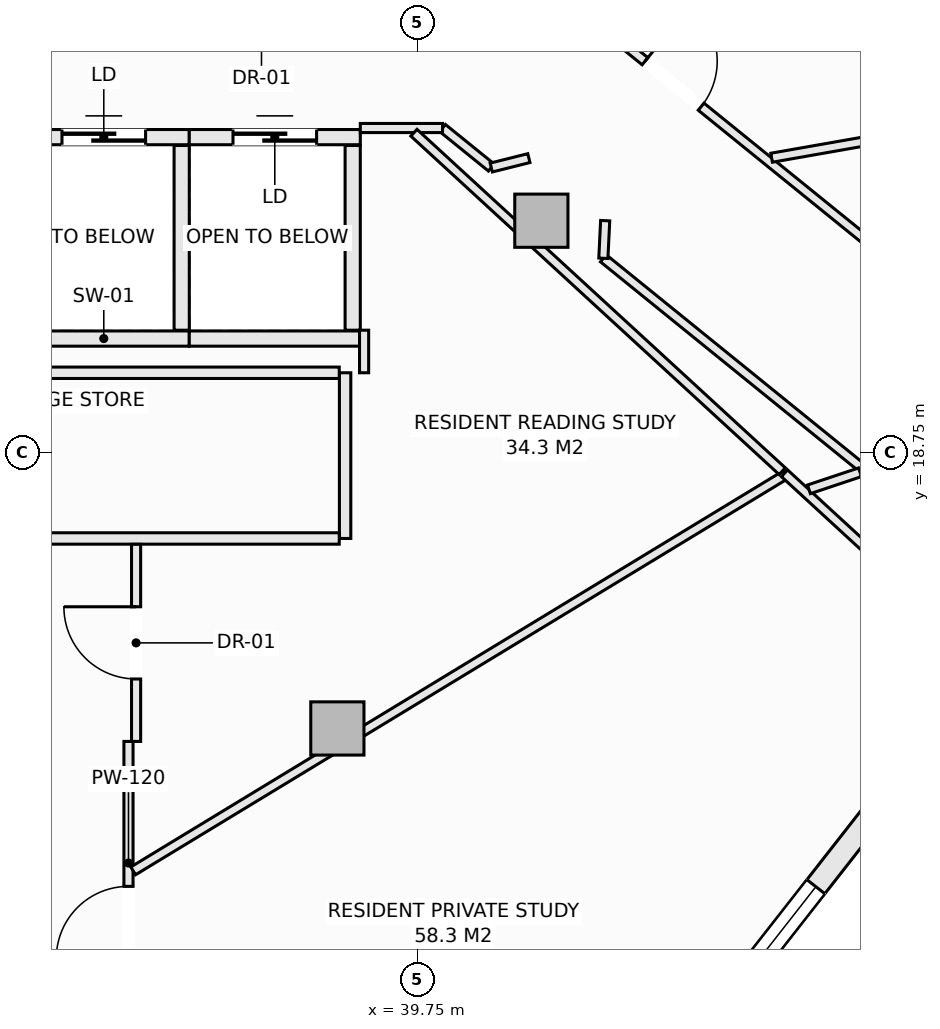
"""IFC4 building model, lengths in metres.
Left out: names, types, materials, properties, quantities, classifications, styles, units other than length and angle.
Written with IfcOpenShell. Run it as: python <this file> out.ifc"""

import sys

from ifc_helpers import new_model, si_unit, direction, frame, frame_2d, origin, origin_2d, place, context, subcontext, project, spatial, rectangle, extrude, element, fill, save


model = new_model("IFC4")
c1 = context("Model", 3, precision=1e-05, world=origin(), true_north=direction((0.0, 1.0)))
c2 = subcontext(c1, "Body", "Model", "MODEL_VIEW")
j1 = project(units=[si_unit("LENGTHUNIT", "METRE"), si_unit("PLANEANGLEUNIT", "RADIAN")], contexts=[c1])
p1 = place(None, origin())
s1 = spatial("IfcSite", under=j1, at=p1, CompositionType="ELEMENT")
p2 = place(p1, origin())
s2 = spatial("IfcBuilding", under=s1, at=p2, CompositionType="ELEMENT")
p3 = place(p2, frame((0.0, 0.0, 222.8)))
s3 = spatial("IfcBuildingStorey", under=s2, at=p3, CompositionType="ELEMENT", Elevation=222.8)
for number, where, z_axis, x_axis in (
    (1, (38.698, 15.121, -0.27), (0.0, 0.0, 1.0), (1.0, 0.0, 0.0)),
    (2, (41.382, 21.801, -0.27), (0.0, 0.0, 1.0), (1.0, 0.0, 0.0)),
):
    element("IfcColumn", number, at=place(p3, frame(where, z_axis=z_axis, x_axis=x_axis)), inside=s3, PredefinedType="COLUMN", context=c2, shape_type="SweptSolid", body=[
        extrude(rectangle(XDim=0.7, YDim=0.7, at=origin_2d()), origin(), (0.0, 0.0, 1.0), 3.3),
    ])
p4 = place(p3, frame((42.5, 9.853, 0.0), z_axis=(0.0, 0.0, 1.0), x_axis=(0.616450126935, 0.787393955401, 0.0)))
e3 = element("IfcWall", 3, at=p4, inside=s3, PredefinedType="SOLIDWALL", context=c2, shape_type="SweptSolid", body=[
    extrude(rectangle(XDim=5.893, YDim=0.3, at=frame_2d((2.946, 0.0))), origin(), (0.0, 0.0, 1.0), 2.605),
])
p5 = place(p4, frame((1.846, 0.0, 0.72)))
e4 = element("IfcOpeningElement", 4, at=p5, cuts=e3, PredefinedType="OPENING", context=c2, shape_type="SweptSolid", body=[
    extrude(rectangle(XDim=2.2, YDim=1.65, at=frame_2d((1.1, 0.825))), frame((0.0, 0.16, 0.0), z_axis=(0.0, -1.0, 0.0), x_axis=(1.0, 0.0, 0.0)), (0.0, 0.0, 1.0), 0.32),
])
p6 = place(p3, frame((34.5, 22.9, 0.0), z_axis=(0.0, 0.0, 1.0), x_axis=(1.0, 0.0, 0.0)))
e5 = element("IfcWall", 5, at=p6, inside=s3, PredefinedType="SOLIDWALL", context=c2, shape_type="SweptSolid", body=[
    extrude(rectangle(XDim=2.25, YDim=0.2, at=frame_2d((1.125, 0.0))), origin(), (0.0, 0.0, 1.0), 3.03),
])
p7 = place(p6, frame((0.575, 0.0, 0.0)))
e6 = element("IfcOpeningElement", 6, at=p7, cuts=e5, PredefinedType="OPENING", context=c2, shape_type="SweptSolid", body=[
    extrude(rectangle(XDim=1.1, YDim=2.2, at=frame_2d((0.55, 1.1))), frame((0.0, 0.11, 0.0), z_axis=(0.0, -1.0, 0.0), x_axis=(1.0, 0.0, 0.0)), (0.0, 0.0, 1.0), 0.22),
])
p8 = place(p3, frame((34.5, 20.25, 0.0), z_axis=(0.0, 0.0, 1.0), x_axis=(1.0, 0.0, 0.0)))
e7 = element("IfcWall", 7, at=p8, inside=s3, PredefinedType="SOLIDWALL", context=c2, shape_type="SweptSolid", body=[
    extrude(rectangle(XDim=2.25, YDim=0.2, at=frame_2d((1.125, 0.0))), origin(), (0.0, 0.0, 1.0), 3.03),
])
p9 = place(p3, frame((36.65, 20.36, 0.0), z_axis=(0.0, 0.0, 1.0), x_axis=(0.0, 1.0, 0.0)))
e8 = element("IfcWall", 8, at=p9, inside=s3, PredefinedType="SOLIDWALL", context=c2, shape_type="SweptSolid", body=[
    extrude(rectangle(XDim=2.43, YDim=0.2, at=frame_2d((1.215, 0.0))), origin(), (0.0, 0.0, 1.0), 3.03),
])
p10 = place(p3, frame((36.75, 22.9, 0.0), z_axis=(0.0, 0.0, 1.0), x_axis=(1.0, 0.0, 0.0)))
e9 = element("IfcWall", 9, at=p10, inside=s3, PredefinedType="SOLIDWALL", context=c2, shape_type="SweptSolid", body=[
    extrude(rectangle(XDim=2.25, YDim=0.2, at=frame_2d((1.125, 0.0))), origin(), (0.0, 0.0, 1.0), 3.03),
])
p11 = place(p10, frame((0.575, 0.0, 0.0)))
e10 = element("IfcOpeningElement", 10, at=p11, cuts=e9, PredefinedType="OPENING", context=c2, shape_type="SweptSolid", body=[
    extrude(rectangle(XDim=1.1, YDim=2.2, at=frame_2d((0.55, 1.1))), frame((0.0, 0.11, 0.0), z_axis=(0.0, -1.0, 0.0), x_axis=(1.0, 0.0, 0.0)), (0.0, 0.0, 1.0), 0.22),
])
p12 = place(p3, frame((36.75, 20.25, 0.0), z_axis=(0.0, 0.0, 1.0), x_axis=(1.0, 0.0, 0.0)))
e11 = element("IfcWall", 11, at=p12, inside=s3, PredefinedType="SOLIDWALL", context=c2, shape_type="SweptSolid", body=[
    extrude(rectangle(XDim=2.25, YDim=0.2, at=frame_2d((1.125, 0.0))), origin(), (0.0, 0.0, 1.0), 3.03),
])
p13 = place(p3, frame((38.9, 20.36, 0.0), z_axis=(0.0, 0.0, 1.0), x_axis=(0.0, 1.0, 0.0)))
e12 = element("IfcWall", 12, at=p13, inside=s3, PredefinedType="SOLIDWALL", context=c2, shape_type="SweptSolid", body=[
    extrude(rectangle(XDim=2.43, YDim=0.2, at=frame_2d((1.215, 0.0))), origin(), (0.0, 0.0, 1.0), 3.03),
])
p14 = place(p3, frame((38.8, 17.62, 0.0), z_axis=(0.0, 0.0, 1.0), x_axis=(0.0, 1.0, 0.0)))
e13 = element("IfcWall", 13, at=p14, inside=s3, PredefinedType="PARTITIONING", context=c2, shape_type="SweptSolid", body=[
    extrude(rectangle(XDim=2.18, YDim=0.15, at=frame_2d((1.09, 0.0))), origin(), (0.0, 0.0, 1.0), 3.03),
])
p15 = place(p3, frame((30.077, 17.62, 0.0), z_axis=(0.0, 0.0, 1.0), x_axis=(1.0, 0.0, 0.0)))
e14 = element("IfcWall", 14, at=p15, inside=s3, PredefinedType="PARTITIONING", context=c2, shape_type="SweptSolid", body=[
    extrude(rectangle(XDim=8.646, YDim=0.15, at=frame_2d((4.323, 0.0))), origin(), (0.0, 0.0, 1.0), 3.03),
])
p16 = place(p15, frame((2.717, 0.0, 0.0)))
e15 = element("IfcOpeningElement", 15, at=p16, cuts=e14, PredefinedType="OPENING", context=c2, shape_type="SweptSolid", body=[
    extrude(rectangle(XDim=0.95, YDim=2.1, at=frame_2d((0.475, 1.05))), frame((0.0, 0.085, 0.0), z_axis=(0.0, -1.0, 0.0), x_axis=(1.0, 0.0, 0.0)), (0.0, 0.0, 1.0), 0.17),
])
p17 = place(p3, frame((30.077, 19.8, 0.0), z_axis=(0.0, 0.0, 1.0), x_axis=(1.0, 0.0, 0.0)))
e16 = element("IfcWall", 16, at=p17, inside=s3, PredefinedType="PARTITIONING", context=c2, shape_type="SweptSolid", body=[
    extrude(rectangle(XDim=8.646, YDim=0.15, at=frame_2d((4.323, 0.0))), origin(), (0.0, 0.0, 1.0), 3.03),
])
p18 = place(p3, frame((39.05, 19.8, 0.0), z_axis=(0.0, 0.0, 1.0), x_axis=(0.0, 1.0, 0.0)))
e17 = element("IfcWall", 17, at=p18, inside=s3, PredefinedType="PARTITIONING", context=c2, shape_type="SweptSolid", body=[
    extrude(rectangle(XDim=0.56, YDim=0.12, at=frame_2d((0.28, 0.0))), origin(), (0.0, 0.0, 1.0), 3.03),
])
p19 = place(p3, frame((41.52, 24.892, 0.0), z_axis=(0.0, 0.0, 1.0), x_axis=(0.777027167904, -0.629467060567, 0.0)))
e18 = element("IfcWall", 18, at=p19, inside=s3, PredefinedType="PARTITIONING", context=c2, shape_type="SweptSolid", body=[
    extrude(rectangle(XDim=8.62, YDim=0.12, at=frame_2d((4.31, 0.0))), origin(), (0.0, 0.0, 1.0), 2.77),
])
p20 = place(p19, frame((5.4, 0.0, 0.0)))
e19 = element("IfcOpeningElement", 19, at=p20, cuts=e18, PredefinedType="OPENING", context=c2, shape_type="SweptSolid", body=[
    extrude(rectangle(XDim=0.95, YDim=2.1, at=frame_2d((0.475, 1.05))), frame((0.0, 0.07, 0.0), z_axis=(0.0, -1.0, 0.0), x_axis=(1.0, 0.0, 0.0)), (0.0, 0.0, 1.0), 0.14),
])
p21 = place(p19, frame((1.578, 0.0, 0.0)))
e20 = element("IfcOpeningElement", 20, at=p21, cuts=e18, PredefinedType="OPENING", context=c2, shape_type="SweptSolid", body=[
    extrude(rectangle(XDim=0.95, YDim=2.1, at=frame_2d((0.475, 1.05))), frame((0.0, 0.07, 0.0), z_axis=(0.0, -1.0, 0.0), x_axis=(1.0, 0.0, 0.0)), (0.0, 0.0, 1.0), 0.14),
])
p22 = place(p3, frame((40.082, 23.02, 0.0), z_axis=(0.0, 0.0, 1.0), x_axis=(0.776900403314, -0.629623509195, 0.0)))
e21 = element("IfcWall", 21, at=p22, inside=s3, PredefinedType="PARTITIONING", context=c2, shape_type="SweptSolid", body=[
    extrude(rectangle(XDim=0.825, YDim=0.12, at=frame_2d((0.413, 0.0))), origin(), (0.0, 0.0, 1.0), 3.03),
])
p23 = place(p3, frame((42.198, 21.306, 0.0), z_axis=(0.0, 0.0, 1.0), x_axis=(0.777012245854, -0.629485480208, 0.0)))
e22 = element("IfcWall", 22, at=p23, inside=s3, PredefinedType="PARTITIONING", context=c2, shape_type="SweptSolid", body=[
    extrude(rectangle(XDim=4.718, YDim=0.12, at=frame_2d((2.359, 0.0))), origin(), (0.0, 0.0, 1.0), 2.77),
])
p24 = place(p3, frame((42.198, 21.306, 0.0), z_axis=(0.0, 0.0, 1.0), x_axis=(0.048267148556, 0.998834461946, 0.0)))
e23 = element("IfcWall", 23, at=p24, inside=s3, PredefinedType="PARTITIONING", context=c2, shape_type="SweptSolid", body=[
    extrude(rectangle(XDim=0.496, YDim=0.12, at=frame_2d((0.248, 0.0))), origin(), (0.0, 0.0, 1.0), 3.03),
])
p25 = place(p3, frame((40.723, 22.5, 0.0), z_axis=(0.0, 0.0, 1.0), x_axis=(0.970029850173, 0.24298578101, 0.0)))
e24 = element("IfcWall", 24, at=p25, inside=s3, PredefinedType="PARTITIONING", context=c2, shape_type="SweptSolid", body=[
    extrude(rectangle(XDim=0.51, YDim=0.12, at=frame_2d((0.255, 0.0))), origin(), (0.0, 0.0, 1.0), 3.03),
])
p26 = place(p3, frame((39.0, 23.02, 0.0), z_axis=(0.0, 0.0, 1.0), x_axis=(1.0, 0.0, 0.0)))
e25 = element("IfcWall", 25, at=p26, inside=s3, PredefinedType="PARTITIONING", context=c2, shape_type="SweptSolid", body=[
    extrude(rectangle(XDim=1.082, YDim=0.12, at=frame_2d((0.541, 0.0))), origin(), (0.0, 0.0, 1.0), 3.03),
])
p27 = place(p3, frame((36.05, 14.95, 0.0), z_axis=(0.0, 0.0, 1.0), x_axis=(0.0, 1.0, 0.0)))
e26 = element("IfcWall", 26, at=p27, inside=s3, PredefinedType="PARTITIONING", context=c2, shape_type="SweptSolid", body=[
    extrude(rectangle(XDim=2.593, YDim=0.12, at=frame_2d((1.296, 0.0))), origin(), (0.0, 0.0, 1.0), 3.03),
])
p28 = place(p27, frame((0.822, 0.0, 0.0)))
e27 = element("IfcOpeningElement", 27, at=p28, cuts=e26, PredefinedType="OPENING", context=c2, shape_type="SweptSolid", body=[
    extrude(rectangle(XDim=0.95, YDim=2.1, at=frame_2d((0.475, 1.05))), frame((0.0, 0.07, 0.0), z_axis=(0.0, -1.0, 0.0), x_axis=(1.0, 0.0, 0.0)), (0.0, 0.0, 1.0), 0.14),
])
p29 = place(p3, frame((35.95, 11.75, 0.0), z_axis=(0.0, 0.0, 1.0), x_axis=(0.0, 1.0, 0.0)))
e28 = element("IfcWall", 28, at=p29, inside=s3, PredefinedType="PARTITIONING", context=c2, shape_type="SweptSolid", body=[
    extrude(rectangle(XDim=3.2, YDim=0.12, at=frame_2d((1.6, 0.0))), origin(), (0.0, 0.0, 1.0), 3.03),
])
p30 = place(p29, frame((0.343, 0.0, 0.0)))
e29 = element("IfcOpeningElement", 29, at=p30, cuts=e28, PredefinedType="OPENING", context=c2, shape_type="SweptSolid", body=[
    extrude(rectangle(XDim=0.95, YDim=2.1, at=frame_2d((0.475, 1.05))), frame((0.0, 0.07, 0.0), z_axis=(0.0, -1.0, 0.0), x_axis=(1.0, 0.0, 0.0)), (0.0, 0.0, 1.0), 0.14),
])
p31 = place(p3, frame((36.012, 13.247, 0.0), z_axis=(0.0, 0.0, 1.0), x_axis=(0.85474937032, 0.519040955934, 0.0)))
e30 = element("IfcWall", 30, at=p31, inside=s3, PredefinedType="PARTITIONING", context=c2, shape_type="SweptSolid", body=[
    extrude(rectangle(XDim=10.04, YDim=0.12, at=frame_2d((5.02, 0.0))), origin(), (0.0, 0.0, 1.0), 3.03),
])
p32 = place(p3, frame((39.706, 22.958, 0.0), z_axis=(0.0, 0.0, 1.0), x_axis=(0.73633751064, -0.676614417837, 0.0)))
e31 = element("IfcWall", 31, at=p32, inside=s3, PredefinedType="PARTITIONING", context=c2, shape_type="SweptSolid", body=[
    extrude(rectangle(XDim=6.582, YDim=0.12, at=frame_2d((3.291, 0.0))), origin(), (0.0, 0.0, 1.0), 3.03),
])
p33 = place(p3, frame((44.581, 18.478, 0.0), z_axis=(0.0, 0.0, 1.0), x_axis=(0.736361674887, -0.676588119729, 0.0)))
e32 = element("IfcWall", 32, at=p33, inside=s3, PredefinedType="PARTITIONING", context=c2, shape_type="SweptSolid", body=[
    extrude(rectangle(XDim=4.427, YDim=0.12, at=frame_2d((2.214, 0.0))), origin(), (0.0, 0.0, 1.0), 3.03),
])
p34 = place(p3, frame((44.903, 18.267, 0.0), z_axis=(0.0, 0.0, 1.0), x_axis=(0.948614335511, 0.316434578488, 0.0)))
e33 = element("IfcWall", 33, at=p34, inside=s3, PredefinedType="PARTITIONING", context=c2, shape_type="SweptSolid", body=[
    extrude(rectangle(XDim=0.708, YDim=0.12, at=frame_2d((0.354, 0.0))), origin(), (0.0, 0.0, 1.0), 3.03),
])
p35 = place(p3, frame((44.412, 22.629, 0.0), z_axis=(0.0, 0.0, 1.0), x_axis=(0.984937605234, 0.172910132136, 0.0)))
e34 = element("IfcWall", 34, at=p35, inside=s3, PredefinedType="PARTITIONING", context=c2, shape_type="SweptSolid", body=[
    extrude(rectangle(XDim=10.026, YDim=0.12, at=frame_2d((5.013, 0.0))), origin(), (0.0, 0.0, 1.0), 2.77),
])
p36 = place(p5, origin())
e35 = element("IfcWindow", 35, at=p36, inside=s3, PartitioningType="SINGLE_PANEL", PredefinedType="WINDOW", context=c2, shape_type="SweptSolid", body=[
    extrude(rectangle(XDim=2.2, YDim=1.65, at=frame_2d((1.1, 0.825))), frame((0.0, 0.03, 0.0), z_axis=(0.0, -1.0, 0.0), x_axis=(1.0, 0.0, 0.0)), (0.0, 0.0, 1.0), 0.06),
])
fill(e4, e35)
p37 = place(p7, origin())
e36 = element("IfcDoor", 36, at=p37, inside=s3, OperationType="SLIDING_TO_LEFT", PredefinedType="DOOR", context=c2, shape_type="SweptSolid", body=[
    extrude(rectangle(XDim=1.1, YDim=2.2, at=frame_2d((0.55, 1.1))), frame((0.0, 0.025, 0.0), z_axis=(0.0, -1.0, 0.0), x_axis=(1.0, 0.0, 0.0)), (0.0, 0.0, 1.0), 0.05),
])
fill(e6, e36)
p38 = place(p11, origin())
e37 = element("IfcDoor", 37, at=p38, inside=s3, OperationType="SLIDING_TO_LEFT", PredefinedType="DOOR", context=c2, shape_type="SweptSolid", body=[
    extrude(rectangle(XDim=1.1, YDim=2.2, at=frame_2d((0.55, 1.1))), frame((0.0, 0.025, 0.0), z_axis=(0.0, -1.0, 0.0), x_axis=(1.0, 0.0, 0.0)), (0.0, 0.0, 1.0), 0.05),
])
fill(e10, e37)
p39 = place(p30, origin())
e38 = element("IfcDoor", 38, at=p39, inside=s3, OperationType="SINGLE_SWING_LEFT", PredefinedType="DOOR", context=c2, shape_type="SweptSolid", body=[
    extrude(rectangle(XDim=0.95, YDim=2.1, at=frame_2d((0.475, 1.05))), frame((0.0, 0.025, 0.0), z_axis=(0.0, -1.0, 0.0), x_axis=(1.0, 0.0, 0.0)), (0.0, 0.0, 1.0), 0.05),
])
fill(e29, e38)
p40 = place(p28, origin())
e39 = element("IfcDoor", 39, at=p40, inside=s3, OperationType="SINGLE_SWING_RIGHT", PredefinedType="DOOR", context=c2, shape_type="SweptSolid", body=[
    extrude(rectangle(XDim=0.95, YDim=2.1, at=frame_2d((0.475, 1.05))), frame((0.0, 0.025, 0.0), z_axis=(0.0, -1.0, 0.0), x_axis=(1.0, 0.0, 0.0)), (0.0, 0.0, 1.0), 0.05),
])
fill(e27, e39)
p41 = place(p21, origin())
e40 = element("IfcDoor", 40, at=p41, inside=s3, OperationType="SINGLE_SWING_LEFT", PredefinedType="DOOR", context=c2, shape_type="SweptSolid", body=[
    extrude(rectangle(XDim=0.95, YDim=2.1, at=frame_2d((0.475, 1.05))), frame((0.0, 0.025, 0.0), z_axis=(0.0, -1.0, 0.0), x_axis=(1.0, 0.0, 0.0)), (0.0, 0.0, 1.0), 0.05),
])
fill(e20, e40)
save(model, sys.argv[1])
